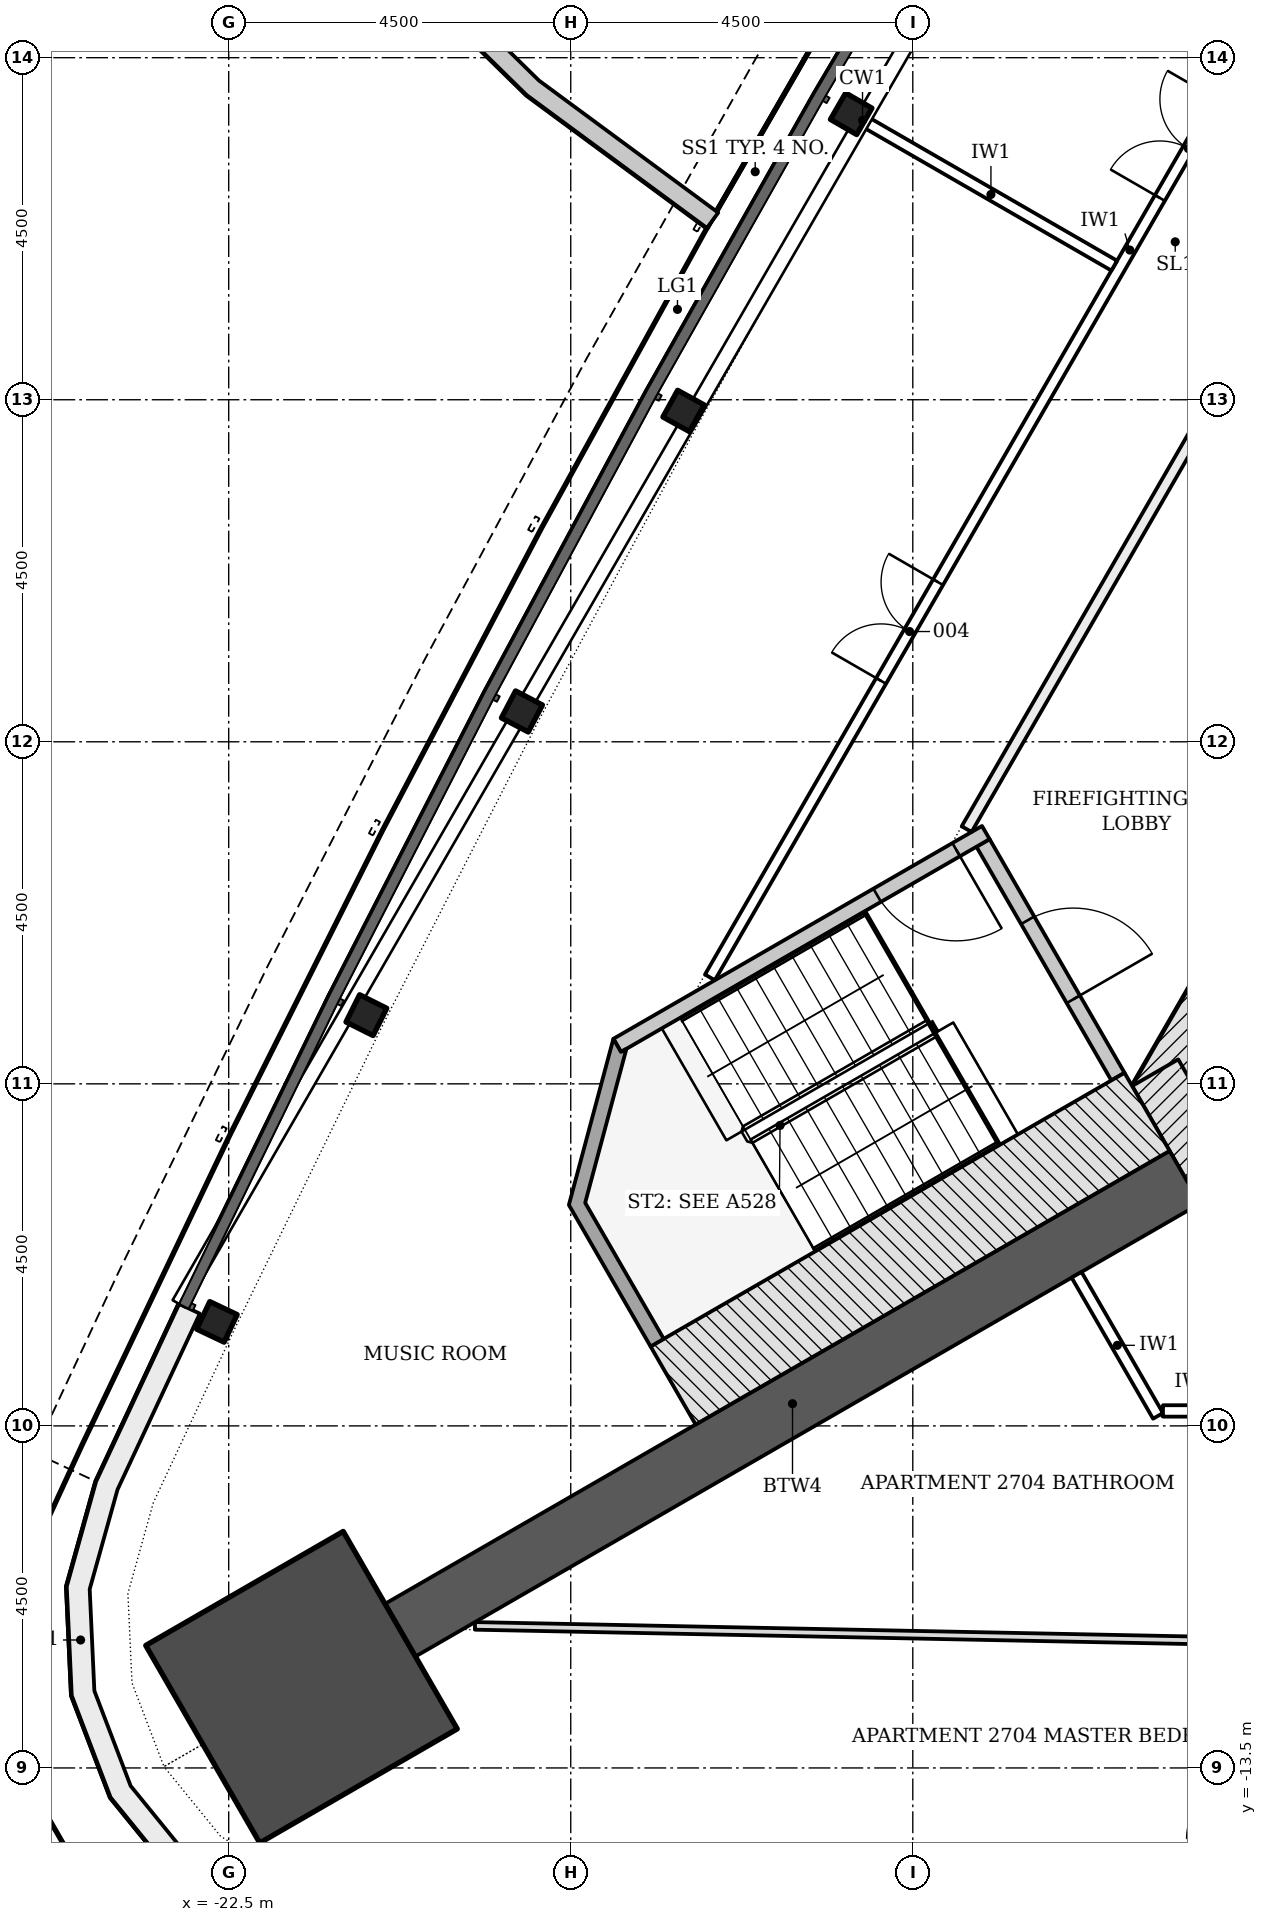
"""IFC4 building model, lengths in metres.
Left out: names, types, materials, properties, quantities, classifications, styles, units other than length and angle.
Written with IfcOpenShell. Run it as: python <this file> out.ifc"""

import sys

from ifc_helpers import new_model, si_unit, direction, frame, frame_2d, origin, origin_2d, place, context, subcontext, project, spatial, polyline, rectangle, i_section, outline, extrude, element, fill, save


model = new_model("IFC4")
c1 = context("Model", 3, precision=1e-05, world=origin(), true_north=direction((0.0, 1.0)))
c2 = subcontext(c1, "Body", "Model", "MODEL_VIEW")
j1 = project(units=[si_unit("LENGTHUNIT", "METRE"), si_unit("PLANEANGLEUNIT", "RADIAN")], contexts=[c1])
p1 = place(None, origin())
s1 = spatial("IfcSite", under=j1, at=p1, CompositionType="ELEMENT")
p2 = place(p1, origin())
s2 = spatial("IfcBuilding", under=s1, at=p2, CompositionType="ELEMENT")
p3 = place(p2, frame((0.0, 0.0, 105.9)))
s3 = spatial("IfcBuildingStorey", under=s2, at=p3, CompositionType="ELEMENT", Elevation=105.9)
p4 = place(p3, frame((-1.083, 11.281, -0.2), z_axis=(0.0, 0.0, 1.0), x_axis=(-0.500001446645, -0.866024568562, 0.0)))
e1 = element("IfcWall", 1, at=p4, inside=s3, PredefinedType="SHEAR", context=c2, shape_type="SweptSolid", body=[
    extrude(rectangle(XDim=18.458, YDim=0.7, at=frame_2d((9.229, 0.0))), origin(), (0.0, 0.0, 1.0), 3.6),
])
p5 = place(p4, frame((8.979, 0.0, 0.2)))
e2 = element("IfcOpeningElement", 2, at=p5, cuts=e1, PredefinedType="OPENING", context=c2, shape_type="SweptSolid", body=[
    extrude(rectangle(XDim=1.2, YDim=2.1, at=frame_2d((0.6, 1.05))), frame((0.0, 0.36, 0.0), z_axis=(0.0, -1.0, 0.0), x_axis=(1.0, 0.0, 0.0)), (0.0, 0.0, 1.0), 0.72),
])
p6 = place(p4, frame((11.029, 0.0, 0.2)))
e3 = element("IfcOpeningElement", 3, at=p6, cuts=e1, PredefinedType="OPENING", context=c2, shape_type="SweptSolid", body=[
    extrude(rectangle(XDim=1.2, YDim=2.1, at=frame_2d((0.6, 1.05))), frame((0.0, 0.36, 0.0), z_axis=(0.0, -1.0, 0.0), x_axis=(1.0, 0.0, 0.0)), (0.0, 0.0, 1.0), 0.72),
])
p7 = place(p3, frame((-10.311, -4.353, -0.2), z_axis=(0.0, 0.0, 1.0), x_axis=(0.500042739161, -0.866000726912, 0.0)))
e4 = element("IfcWall", 4, at=p7, inside=s3, PredefinedType="SHEAR", context=c2, shape_type="SweptSolid", body=[
    extrude(rectangle(XDim=2.771, YDim=0.7, at=frame_2d((1.386, 0.0))), origin(), (0.0, 0.0, 1.0), 3.6),
])
p8 = place(p3, frame((-9.922, -5.728, -0.2), z_axis=(0.0, 0.0, 1.0), x_axis=(-0.866027307971, -0.499996701837, 0.0)))
e5 = element("IfcWall", 5, at=p8, inside=s3, PredefinedType="SHEAR", context=c2, shape_type="SweptSolid", body=[
    extrude(rectangle(XDim=11.918, YDim=0.8, at=frame_2d((5.959, 0.0))), origin(), (0.0, 0.0, 1.0), 3.6),
])
p9 = place(p3, frame((-21.542, -12.438, -0.2), z_axis=(0.0, 0.0, 1.0), x_axis=(-0.866025403784, -0.5, 0.0)))
e6 = element("IfcColumn", 6, at=p9, inside=s3, PredefinedType="COLUMN", context=c2, shape_type="SweptSolid", body=[
    extrude(rectangle(XDim=3.0, YDim=3.0, at=origin_2d()), origin(), (0.0, 0.0, 1.0), 3.6),
])
for number, where, z_axis, x_axis in (
    (7, (-14.311, 8.262, -0.2), (0.0, 0.0, 1.0), (-0.5, -0.866, 0.0)),
    (8, (-16.516, 4.353, -0.2), (0.0, 0.0, 1.0), (-0.483, -0.876, 0.0)),
    (9, (-18.642, 0.399, -0.2), (0.0, 0.0, 1.0), (-0.465, -0.885, 0.0)),
    (10, (-20.689, -3.596, -0.2), (0.0, 0.0, 1.0), (-0.447, -0.895, 0.0)),
    (11, (-22.655, -7.632, -0.2), (0.0, 0.0, 1.0), (-0.429, -0.903, 0.0)),
):
    element("IfcColumn", number, at=place(p3, frame(where, z_axis=z_axis, x_axis=x_axis)), inside=s3, PredefinedType="COLUMN", context=c2, shape_type="SweptSolid", body=[
        extrude(i_section(OverallWidth=0.401, OverallDepth=0.399, WebThickness=0.025, FlangeThickness=0.04, FilletRadius=0.015, at=origin_2d()), origin(), (0.0, 0.0, 1.0), 3.6),
    ])
p10 = place(p3, origin())
e12 = element("IfcWall", 12, at=p10, inside=s3, PredefinedType="NOTDEFINED", context=c2, shape_type="SweptSolid", body=[
    extrude(outline(polyline([(-23.152, -7.396), (-24.245, -9.732), (-24.631, -11.114), (-24.565, -12.547), (-24.054, -13.887), (-23.148, -15.0), (-21.94, -15.774), (-20.551, -16.13), (-17.981, -16.352), (-17.955, -16.053), (-20.5, -15.833), (-21.819, -15.495), (-22.946, -14.774), (-23.791, -13.735), (-24.267, -12.485), (-24.329, -11.148), (-23.962, -9.837), (-22.88, -7.523), (-23.152, -7.396)])), origin(), (0.0, 0.0, 1.0), 3.3),
])
p11 = place(p3, origin())
e13 = element("IfcWall", 13, at=p11, inside=s3, PredefinedType="PARAPET", context=c2, shape_type="SweptSolid", body=[
    extrude(outline(polyline([(-3.375, 26.953), (-5.966, 28.358), (-8.687, 29.371), (-11.446, 29.958), (-14.148, 30.099), (-16.702, 29.789), (-19.02, 29.039), (-21.024, 27.873), (-22.646, 26.333), (-23.83, 24.469), (-24.536, 22.347), (-24.74, 20.038), (-24.435, 17.62), (-23.631, 15.176), (-22.356, 12.79), (-20.653, 10.542), (-18.58, 8.509), (-16.208, 6.76), (-16.06, 6.961), (-18.418, 8.699), (-20.465, 10.707), (-22.145, 12.925), (-23.4, 15.275), (-24.19, 17.675), (-24.489, 20.042), (-24.29, 22.296), (-23.603, 24.362), (-22.452, 26.173), (-20.873, 27.672), (-18.918, 28.809), (-16.647, 29.544), (-14.139, 29.848), (-11.478, 29.709), (-8.757, 29.13), (-6.07, 28.129), (-3.495, 26.733), (-3.375, 26.953)])), origin(), (0.0, 0.0, 1.0), 1.1),
])
p12 = place(p3, frame((-12.576, -1.331, -0.2), z_axis=(0.0, 0.0, 1.0), x_axis=(0.499970499736, -0.8660424351, 0.0)))
e14 = element("IfcWall", 14, at=p12, inside=s3, PredefinedType="SHEAR", context=c2, shape_type="SweptSolid", body=[
    extrude(rectangle(XDim=3.55, YDim=0.2, at=frame_2d((1.775, 0.0))), origin(), (0.0, 0.0, 1.0), 3.6),
])
p13 = place(p12, frame((1.175, 0.0, 0.2)))
e15 = element("IfcOpeningElement", 15, at=p13, cuts=e14, PredefinedType="OPENING", context=c2, shape_type="SweptSolid", body=[
    extrude(rectangle(XDim=1.2, YDim=2.1, at=frame_2d((0.6, 1.05))), frame((0.0, 0.11, 0.0), z_axis=(0.0, -1.0, 0.0), x_axis=(1.0, 0.0, 0.0)), (0.0, 0.0, 1.0), 0.22),
])
p14 = place(p3, frame((-12.539, -1.194, -0.2), z_axis=(0.0, 0.0, 1.0), x_axis=(-0.866045472092, -0.499965239061, 0.0)))
e16 = element("IfcWall", 16, at=p14, inside=s3, PredefinedType="SHEAR", context=c2, shape_type="SweptSolid", body=[
    extrude(rectangle(XDim=5.6, YDim=0.2, at=frame_2d((2.8, 0.0))), origin(), (0.0, 0.0, 1.0), 3.6),
])
p15 = place(p14, frame((0.45, 0.0, 0.2)))
e17 = element("IfcOpeningElement", 17, at=p15, cuts=e16, PredefinedType="OPENING", context=c2, shape_type="SweptSolid", body=[
    extrude(rectangle(XDim=1.2, YDim=2.1, at=frame_2d((0.6, 1.05))), frame((0.0, 0.11, 0.0), z_axis=(0.0, -1.0, 0.0), x_axis=(1.0, 0.0, 0.0)), (0.0, 0.0, 1.0), 0.22),
])
p16 = place(p3, frame((-10.418, -4.868, -0.2), z_axis=(0.0, 0.0, 1.0), x_axis=(-0.866018442252, -0.500012057535, 0.0)))
e18 = element("IfcWall", 18, at=p16, inside=s3, PredefinedType="SHEAR", context=c2, shape_type="SweptSolid", body=[
    extrude(rectangle(XDim=7.2, YDim=1.186, at=frame_2d((3.6, 0.0))), origin(), (0.0, 0.0, 1.0), 3.6),
])
p17 = place(p3, frame((0.0, 0.0, -0.2)))
e19 = element("IfcWall", 19, at=p17, inside=s3, PredefinedType="SHEAR", context=c2, shape_type="SweptSolid", body=[
    extrude(outline(polyline([(-17.439, -3.907), (-18.025, -6.093), (-16.95, -7.955), (-16.777, -7.855), (-17.81, -6.065), (-17.267, -4.039), (-17.339, -4.081), (-17.339, -4.081), (-17.339, -4.081), (-17.339, -4.081), (-17.339, -4.081), (-17.339, -4.081), (-17.339, -4.081), (-17.339, -4.081), (-17.339, -4.081), (-17.339, -4.081), (-17.339, -4.081), (-17.339, -4.081), (-17.339, -4.081), (-17.339, -4.081), (-17.339, -4.081), (-17.339, -4.081), (-17.339, -4.081), (-17.439, -3.907)])), origin(), (0.0, 0.0, 1.0), 3.6),
])
p18 = place(p3, frame((-16.169, -3.099, 0.0), z_axis=(0.0, 0.0, 1.0), x_axis=(0.499999805269, 0.866025516212, 0.0)))
e20 = element("IfcWall", 20, at=p18, inside=s3, PredefinedType="PARTITIONING", context=c2, shape_type="SweptSolid", body=[
    extrude(rectangle(XDim=22.097, YDim=0.15, at=frame_2d((11.049, 0.0))), origin(), (0.0, 0.0, 1.0), 2.847),
])
p19 = place(p18, frame((17.776, 0.0, 0.0)))
e21 = element("IfcOpeningElement", 21, at=p19, cuts=e20, PredefinedType="OPENING", context=c2, shape_type="SweptSolid", body=[
    extrude(rectangle(XDim=1.0, YDim=2.1, at=frame_2d((0.5, 1.05))), frame((0.0, 0.085, 0.0), z_axis=(0.0, -1.0, 0.0), x_axis=(1.0, 0.0, 0.0)), (0.0, 0.0, 1.0), 0.17),
])
p20 = place(p18, frame((15.186, 0.0, 0.0)))
e22 = element("IfcOpeningElement", 22, at=p20, cuts=e20, PredefinedType="OPENING", context=c2, shape_type="SweptSolid", body=[
    extrude(rectangle(XDim=1.0, YDim=2.1, at=frame_2d((0.5, 1.05))), frame((0.0, 0.085, 0.0), z_axis=(0.0, -1.0, 0.0), x_axis=(1.0, 0.0, 0.0)), (0.0, 0.0, 1.0), 0.17),
])
p21 = place(p18, frame((11.84, 0.0, 0.0)))
e23 = element("IfcOpeningElement", 23, at=p21, cuts=e20, PredefinedType="OPENING", context=c2, shape_type="SweptSolid", body=[
    extrude(rectangle(XDim=1.5, YDim=2.1, at=frame_2d((0.75, 1.05))), frame((0.0, 0.085, 0.0), z_axis=(0.0, -1.0, 0.0), x_axis=(1.0, 0.0, 0.0)), (0.0, 0.0, 1.0), 0.17),
])
p22 = place(p18, frame((4.503, 0.0, 0.0)))
e24 = element("IfcOpeningElement", 24, at=p22, cuts=e20, PredefinedType="OPENING", context=c2, shape_type="SweptSolid", body=[
    extrude(rectangle(XDim=1.5, YDim=2.1, at=frame_2d((0.75, 1.05))), frame((0.0, 0.085, 0.0), z_axis=(0.0, -1.0, 0.0), x_axis=(1.0, 0.0, 0.0)), (0.0, 0.0, 1.0), 0.17),
])
p23 = place(p3, frame((-4.407, 13.374, 0.0), z_axis=(0.0, 0.0, 1.0), x_axis=(-0.499997181693, -0.866027030928, 0.0)))
e25 = element("IfcWall", 25, at=p23, inside=s3, PredefinedType="PARTITIONING", context=c2, shape_type="SweptSolid", body=[
    extrude(rectangle(XDim=16.77, YDim=0.15, at=frame_2d((8.385, 0.0))), origin(), (0.0, 0.0, 1.0), 2.847),
])
p24 = place(p23, frame((8.879, 0.0, 0.0)))
e26 = element("IfcOpeningElement", 26, at=p24, cuts=e25, PredefinedType="OPENING", context=c2, shape_type="SweptSolid", body=[
    extrude(rectangle(XDim=1.0, YDim=2.1, at=frame_2d((0.5, 1.05))), frame((0.0, 0.085, 0.0), z_axis=(0.0, -1.0, 0.0), x_axis=(1.0, 0.0, 0.0)), (0.0, 0.0, 1.0), 0.17),
])
p25 = place(p3, frame((-11.345, -7.012, 0.0), z_axis=(0.0, 0.0, 1.0), x_axis=(0.499998569178, -0.866026229868, 0.0)))
e27 = element("IfcWall", 27, at=p25, inside=s3, PredefinedType="PARTITIONING", context=c2, shape_type="SweptSolid", body=[
    extrude(rectangle(XDim=2.143, YDim=0.15, at=frame_2d((1.072, 0.0))), origin(), (0.0, 0.0, 1.0), 3.4),
])
p26 = place(p3, frame((-10.209, -8.803, 0.0), z_axis=(0.0, 0.0, 1.0), x_axis=(1.0, 0.0, 0.0)))
e28 = element("IfcWall", 28, at=p26, inside=s3, PredefinedType="PARTITIONING", context=c2, shape_type="SweptSolid", body=[
    extrude(rectangle(XDim=0.83, YDim=0.15, at=frame_2d((0.415, 0.0))), origin(), (0.0, 0.0, 1.0), 3.4),
])
p27 = place(p3, frame((-14.094, 8.137, 0.0), z_axis=(0.0, 0.0, 1.0), x_axis=(0.866036909293, -0.499980071345, 0.0)))
e29 = element("IfcWall", 29, at=p27, inside=s3, PredefinedType="PARTITIONING", context=c2, shape_type="SweptSolid", body=[
    extrude(rectangle(XDim=3.746, YDim=0.15, at=frame_2d((1.873, 0.0))), origin(), (0.0, 0.0, 1.0), 2.847),
])
p28 = place(p3, frame((-8.885, -11.839, 0.0), z_axis=(0.0, 0.0, 1.0), x_axis=(-0.999798608679, 0.020068434987, 0.0)))
e30 = element("IfcWall", 30, at=p28, inside=s3, PredefinedType="PARTITIONING", context=c2, shape_type="SweptSolid", body=[
    extrude(rectangle(XDim=10.377, YDim=0.1, at=frame_2d((5.188, 0.0))), origin(), (0.0, 0.0, 1.0), 2.847),
])
p29 = place(p13, origin())
e31 = element("IfcDoor", 31, at=p29, inside=s3, OperationType="SINGLE_SWING_RIGHT", PredefinedType="DOOR", context=c2, shape_type="SweptSolid", body=[
    extrude(rectangle(XDim=1.2, YDim=2.1, at=frame_2d((0.6, 1.05))), frame((0.0, 0.025, 0.0), z_axis=(0.0, -1.0, 0.0), x_axis=(1.0, 0.0, 0.0)), (0.0, 0.0, 1.0), 0.05),
])
fill(e15, e31)
p30 = place(p15, origin())
e32 = element("IfcDoor", 32, at=p30, inside=s3, OperationType="SINGLE_SWING_LEFT", PredefinedType="DOOR", context=c2, shape_type="SweptSolid", body=[
    extrude(rectangle(XDim=1.2, YDim=2.1, at=frame_2d((0.6, 1.05))), frame((0.0, 0.025, 0.0), z_axis=(0.0, -1.0, 0.0), x_axis=(1.0, 0.0, 0.0)), (0.0, 0.0, 1.0), 0.05),
])
fill(e17, e32)
p31 = place(p21, origin())
e33 = element("IfcDoor", 33, at=p31, inside=s3, OperationType="DOUBLE_DOOR_SINGLE_SWING", PredefinedType="DOOR", context=c2, shape_type="SweptSolid", body=[
    extrude(rectangle(XDim=1.5, YDim=2.1, at=frame_2d((0.75, 1.05))), frame((0.0, 0.025, 0.0), z_axis=(0.0, -1.0, 0.0), x_axis=(1.0, 0.0, 0.0)), (0.0, 0.0, 1.0), 0.05),
])
fill(e23, e33)
p32 = place(p22, origin())
e34 = element("IfcDoor", 34, at=p32, inside=s3, OperationType="DOUBLE_DOOR_SINGLE_SWING", PredefinedType="DOOR", context=c2, shape_type="SweptSolid", body=[
    extrude(rectangle(XDim=1.5, YDim=2.1, at=frame_2d((0.75, 1.05))), frame((0.0, 0.025, 0.0), z_axis=(0.0, -1.0, 0.0), x_axis=(1.0, 0.0, 0.0)), (0.0, 0.0, 1.0), 0.05),
])
fill(e24, e34)
save(model, sys.argv[1])
